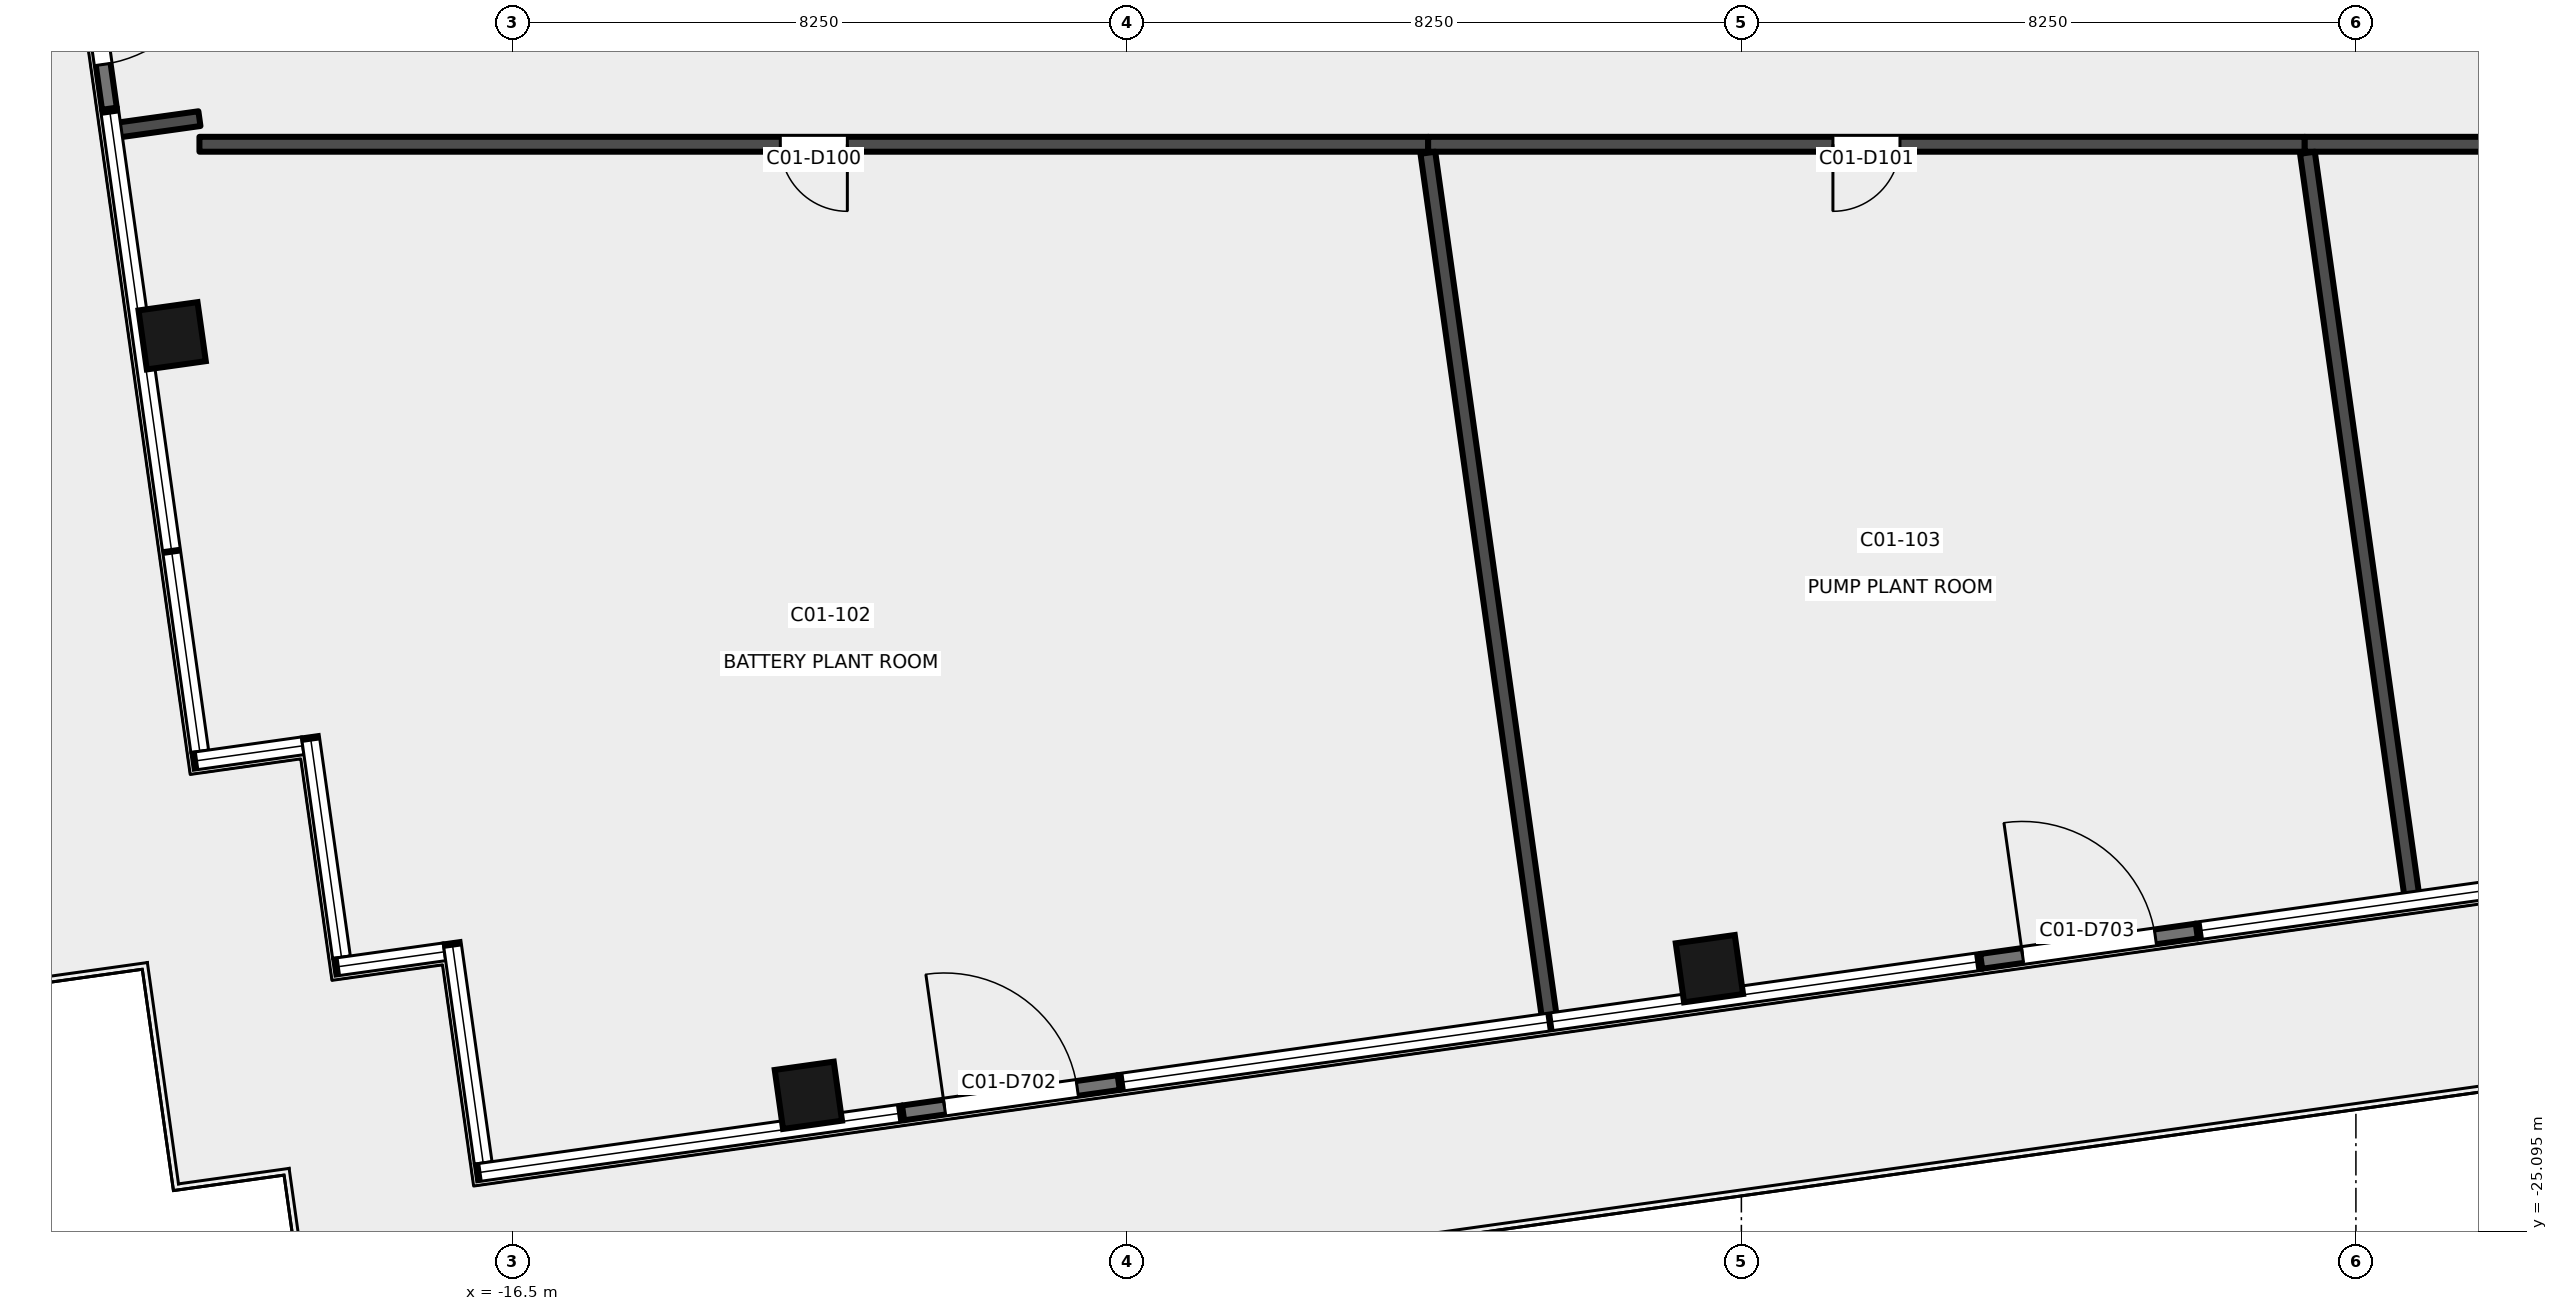
"""IFC4 building model, lengths in metres.
Left out: names, types, materials, properties, quantities, classifications, styles, units other than length and angle.
Written with IfcOpenShell. Run it as: python <this file> out.ifc"""

import sys

from ifc_helpers import new_model, si_unit, direction, frame, frame_2d, origin, origin_2d, place, context, subcontext, project, spatial, rectangle, extrude, element, fill, save


model = new_model("IFC4")
c1 = context("Model", 3, precision=1e-05, world=origin(), true_north=direction((0.0, 1.0)))
c2 = subcontext(c1, "Body", "Model", "MODEL_VIEW")
j1 = project(units=[si_unit("LENGTHUNIT", "METRE"), si_unit("PLANEANGLEUNIT", "RADIAN")], contexts=[c1])
p1 = place(None, origin())
s1 = spatial("IfcSite", under=j1, at=p1, CompositionType="ELEMENT")
p2 = place(p1, origin())
s2 = spatial("IfcBuilding", under=s1, at=p2, CompositionType="ELEMENT")
p3 = place(p2, frame((0.0, 0.0, 292.3)))
s3 = spatial("IfcBuildingStorey", under=s2, at=p3, CompositionType="ELEMENT", Elevation=292.3)
for number, where, z_axis, x_axis in (
    (1, (-12.525, -23.266, -0.2), (0.0, 0.0, 1.0), (0.99, 0.139, 0.0)),
    (2, (-0.429, -21.566, -0.2), (0.0, 0.0, 1.0), (0.99, 0.139, 0.0)),
    (3, (-21.066, -13.071, -0.2), (0.0, 0.0, 1.0), (-0.139, 0.99, 0.0)),
):
    element("IfcColumn", number, at=place(p3, frame(where, z_axis=z_axis, x_axis=x_axis)), inside=s3, PredefinedType="COLUMN", context=c2, shape_type="SweptSolid", body=[
        extrude(rectangle(XDim=0.8, YDim=0.8, at=origin_2d()), origin(), (0.0, 0.0, 1.0), 4.0),
    ])
p4 = place(p3, frame((-22.326, -7.052, 0.0), z_axis=(0.0, 0.0, 1.0), x_axis=(0.139165050317, -0.990269200152, 0.0)))
e4 = element("IfcWall", 4, at=p4, inside=s3, PredefinedType="SOLIDWALL", context=c2, shape_type="SweptSolid", body=[
    extrude(rectangle(XDim=3.0, YDim=0.2, at=frame_2d((1.5, 0.0))), origin(), (0.0, 0.0, 1.0), 2.7),
])
p5 = place(p4, frame((0.6, 0.0, 0.0)))
e5 = element("IfcOpeningElement", 5, at=p5, cuts=e4, PredefinedType="OPENING", context=c2, shape_type="SweptSolid", body=[
    extrude(rectangle(XDim=1.8, YDim=2.4, at=frame_2d((0.9, 1.2))), frame((0.0, 0.111, 0.0), z_axis=(0.0, -1.0, 0.0), x_axis=(1.0, 0.0, 0.0)), (0.0, 0.0, 1.0), 0.221),
])
p6 = place(p3, frame((-11.254, -23.502, 0.0), z_axis=(0.0, 0.0, 1.0), x_axis=(0.990270970939, 0.139152449189, 0.0)))
e6 = element("IfcWall", 6, at=p6, inside=s3, PredefinedType="SOLIDWALL", context=c2, shape_type="SweptSolid", body=[
    extrude(rectangle(XDim=2.923, YDim=0.2, at=frame_2d((1.461, 0.0))), origin(), (0.0, 0.0, 1.0), 2.7),
])
p7 = place(p6, frame((0.562, 0.0, 0.0)))
e7 = element("IfcOpeningElement", 7, at=p7, cuts=e6, PredefinedType="OPENING", context=c2, shape_type="SweptSolid", body=[
    extrude(rectangle(XDim=1.8, YDim=2.4, at=frame_2d((0.9, 1.2))), frame((0.0, 0.111, 0.0), z_axis=(0.0, -1.0, 0.0), x_axis=(1.0, 0.0, 0.0)), (0.0, 0.0, 1.0), 0.221),
])
p8 = place(p3, frame((3.219, -21.468, 0.0), z_axis=(0.0, 0.0, 1.0), x_axis=(0.990270970939, 0.139152449189, 0.0)))
e8 = element("IfcWall", 8, at=p8, inside=s3, PredefinedType="SOLIDWALL", context=c2, shape_type="SweptSolid", body=[
    extrude(rectangle(XDim=2.923, YDim=0.2, at=frame_2d((1.461, 0.0))), origin(), (0.0, 0.0, 1.0), 2.7),
])
p9 = place(p8, frame((0.562, 0.0, 0.0)))
e9 = element("IfcOpeningElement", 9, at=p9, cuts=e8, PredefinedType="OPENING", context=c2, shape_type="SweptSolid", body=[
    extrude(rectangle(XDim=1.8, YDim=2.4, at=frame_2d((0.9, 1.2))), frame((0.0, 0.111, 0.0), z_axis=(0.0, -1.0, 0.0), x_axis=(1.0, 0.0, 0.0)), (0.0, 0.0, 1.0), 0.221),
])
p10 = place(p3, frame((-20.7, -10.156, 0.0), z_axis=(0.0, 0.0, 1.0), x_axis=(-0.99034913568, -0.138595055673, 0.0)))
e10 = element("IfcWall", 10, at=p10, inside=s3, PredefinedType="PARTITIONING", context=c2, shape_type="SweptSolid", body=[
    extrude(rectangle(XDim=1.089, YDim=0.2, at=frame_2d((0.544, 0.0))), origin(), (0.0, 0.0, 1.0), 3.8),
])
p11 = place(p3, frame((-4.205, -10.5, 0.0), z_axis=(0.0, 0.0, 1.0), x_axis=(-1.0, 0.0, 0.0)))
e11 = element("IfcWall", 11, at=p11, inside=s3, PredefinedType="PARTITIONING", context=c2, shape_type="SweptSolid", body=[
    extrude(rectangle(XDim=16.495, YDim=0.2, at=frame_2d((8.248, 0.0))), origin(), (0.0, 0.0, 1.0), 3.1),
])
p12 = place(p11, frame((7.797, 0.0, 0.0)))
e12 = element("IfcOpeningElement", 12, at=p12, cuts=e11, PredefinedType="OPENING", context=c2, shape_type="SweptSolid", body=[
    extrude(rectangle(XDim=0.9, YDim=2.1, at=frame_2d((0.45, 1.05))), frame((0.0, 0.111, 0.0), z_axis=(0.0, -1.0, 0.0), x_axis=(1.0, 0.0, 0.0)), (0.0, 0.0, 1.0), 0.221),
])
p13 = place(p3, frame((7.563, -10.5, 0.0), z_axis=(0.0, 0.0, 1.0), x_axis=(-1.0, 0.0, 0.0)))
e13 = element("IfcWall", 13, at=p13, inside=s3, PredefinedType="PARTITIONING", context=c2, shape_type="SweptSolid", body=[
    extrude(rectangle(XDim=11.768, YDim=0.2, at=frame_2d((5.884, 0.0))), origin(), (0.0, 0.0, 1.0), 3.19),
])
p14 = place(p13, frame((5.434, 0.0, 0.0)))
e14 = element("IfcOpeningElement", 14, at=p14, cuts=e13, PredefinedType="OPENING", context=c2, shape_type="SweptSolid", body=[
    extrude(rectangle(XDim=0.9, YDim=2.1, at=frame_2d((0.45, 1.05))), frame((0.0, 0.111, 0.0), z_axis=(0.0, -1.0, 0.0), x_axis=(1.0, 0.0, 0.0)), (0.0, 0.0, 1.0), 0.221),
])
p15 = place(p3, frame((20.7, -10.5, 0.0), z_axis=(0.0, 0.0, 1.0), x_axis=(-1.0, 0.0, 0.0)))
e15 = element("IfcWall", 15, at=p15, inside=s3, PredefinedType="PARTITIONING", context=c2, shape_type="SweptSolid", body=[
    extrude(rectangle(XDim=13.137, YDim=0.2, at=frame_2d((6.568, 0.0))), origin(), (0.0, 0.0, 1.0), 3.19),
])
p16 = place(p15, frame((6.119, 0.0, 0.0)))
e16 = element("IfcOpeningElement", 16, at=p16, cuts=e15, PredefinedType="OPENING", context=c2, shape_type="SweptSolid", body=[
    extrude(rectangle(XDim=0.9, YDim=2.1, at=frame_2d((0.45, 1.05))), frame((0.0, 0.111, 0.0), z_axis=(0.0, -1.0, 0.0), x_axis=(1.0, 0.0, 0.0)), (0.0, 0.0, 1.0), 0.221),
])
p17 = place(p3, frame((-4.209, -10.614, 0.0), z_axis=(0.0, 0.0, 1.0), x_axis=(0.139166837679, -0.990268948968, 0.0)))
e17 = element("IfcWall", 17, at=p17, inside=s3, PredefinedType="PARTITIONING", context=c2, shape_type="SweptSolid", body=[
    extrude(rectangle(XDim=11.691, YDim=0.2, at=frame_2d((5.845, 0.0))), origin(), (0.0, 0.0, 1.0), 3.8),
])
p18 = place(p3, frame((7.599, -10.614, 0.0), z_axis=(0.0, 0.0, 1.0), x_axis=(0.139131599901, -0.990273900448, 0.0)))
e18 = element("IfcWall", 18, at=p18, inside=s3, PredefinedType="PARTITIONING", context=c2, shape_type="SweptSolid", body=[
    extrude(rectangle(XDim=10.048, YDim=0.2, at=frame_2d((5.024, 0.0))), origin(), (0.0, 0.0, 1.0), 3.19),
])
p19 = place(p5, origin())
e19 = element("IfcDoor", 19, at=p19, inside=s3, OperationType="DOUBLE_DOOR_SINGLE_SWING", PredefinedType="DOOR", context=c2, shape_type="SweptSolid", body=[
    extrude(rectangle(XDim=1.8, YDim=2.4, at=frame_2d((0.9, 1.2))), frame((0.0, 0.025, 0.0), z_axis=(0.0, -1.0, 0.0), x_axis=(1.0, 0.0, 0.0)), (0.0, 0.0, 1.0), 0.05),
])
fill(e5, e19)
p20 = place(p7, origin())
e20 = element("IfcDoor", 20, at=p20, inside=s3, OperationType="DOUBLE_DOOR_SINGLE_SWING", PredefinedType="DOOR", context=c2, shape_type="SweptSolid", body=[
    extrude(rectangle(XDim=1.8, YDim=2.4, at=frame_2d((0.9, 1.2))), frame((0.0, 0.025, 0.0), z_axis=(0.0, -1.0, 0.0), x_axis=(1.0, 0.0, 0.0)), (0.0, 0.0, 1.0), 0.05),
])
fill(e7, e20)
p21 = place(p9, origin())
e21 = element("IfcDoor", 21, at=p21, inside=s3, OperationType="DOUBLE_DOOR_SINGLE_SWING", PredefinedType="DOOR", context=c2, shape_type="SweptSolid", body=[
    extrude(rectangle(XDim=1.8, YDim=2.4, at=frame_2d((0.9, 1.2))), frame((0.0, 0.025, 0.0), z_axis=(0.0, -1.0, 0.0), x_axis=(1.0, 0.0, 0.0)), (0.0, 0.0, 1.0), 0.05),
])
fill(e9, e21)
p22 = place(p12, origin())
e22 = element("IfcDoor", 22, at=p22, inside=s3, OperationType="SINGLE_SWING_LEFT", PredefinedType="DOOR", context=c2, shape_type="SweptSolid", body=[
    extrude(rectangle(XDim=0.9, YDim=2.1, at=frame_2d((0.45, 1.05))), frame((0.0, 0.025, 0.0), z_axis=(0.0, -1.0, 0.0), x_axis=(1.0, 0.0, 0.0)), (0.0, 0.0, 1.0), 0.05),
])
fill(e12, e22)
p23 = place(p14, origin())
e23 = element("IfcDoor", 23, at=p23, inside=s3, OperationType="SINGLE_SWING_RIGHT", PredefinedType="DOOR", context=c2, shape_type="SweptSolid", body=[
    extrude(rectangle(XDim=0.9, YDim=2.1, at=frame_2d((0.45, 1.05))), frame((0.0, 0.025, 0.0), z_axis=(0.0, -1.0, 0.0), x_axis=(1.0, 0.0, 0.0)), (0.0, 0.0, 1.0), 0.05),
])
fill(e14, e23)
save(model, sys.argv[1])
